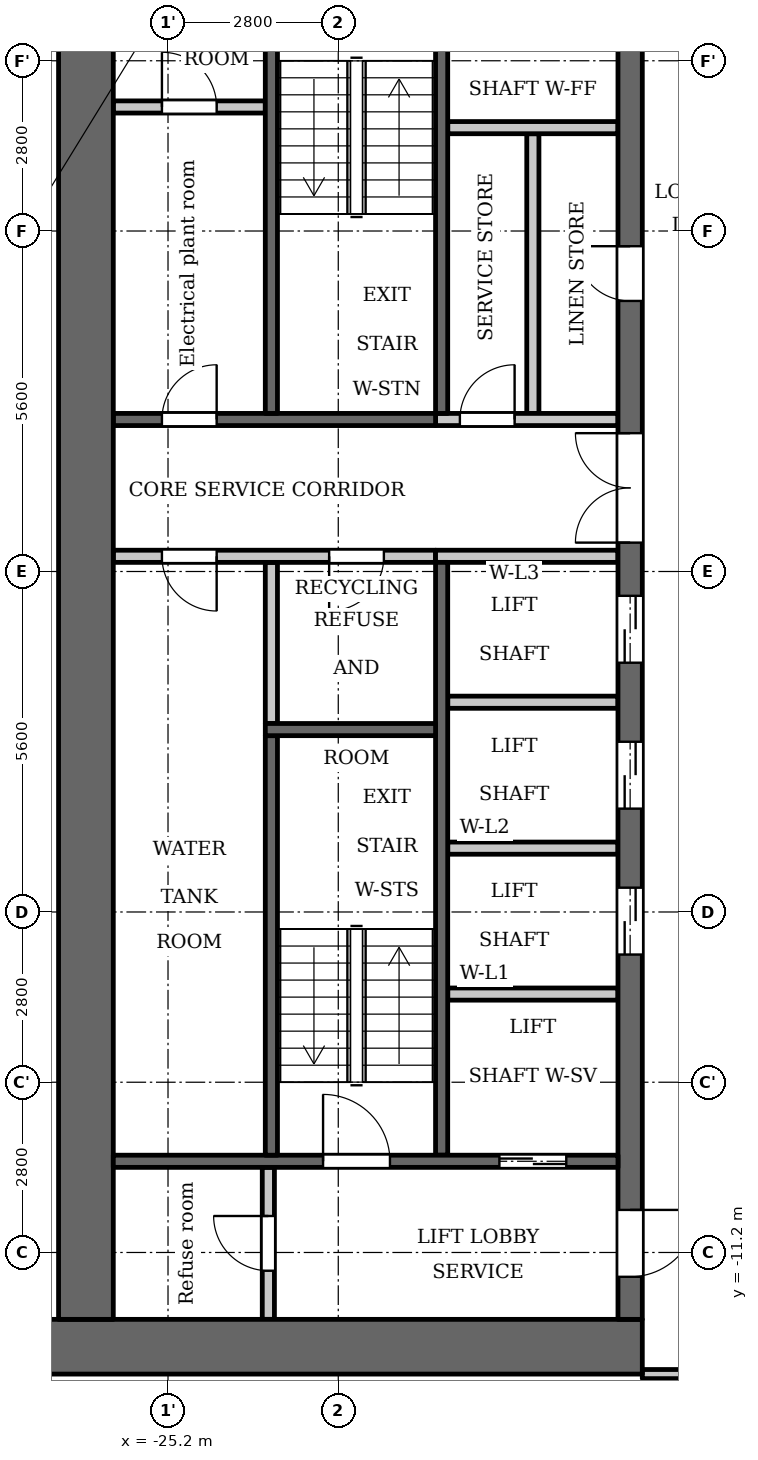
"""IFC4 building model, lengths in metres.
Left out: names, types, materials, properties, quantities, classifications, styles, units other than length and angle.
Written with IfcOpenShell. Run it as: python <this file> out.ifc"""

import sys

from ifc_helpers import new_model, si_unit, direction, frame, frame_2d, origin, place, context, subcontext, project, spatial, rectangle, extrude, element, fill, save


model = new_model("IFC4")
c1 = context("Model", 3, precision=1e-05, world=origin(), true_north=direction((0.0, 1.0)))
c2 = subcontext(c1, "Body", "Model", "MODEL_VIEW")
j1 = project(units=[si_unit("LENGTHUNIT", "METRE"), si_unit("PLANEANGLEUNIT", "RADIAN")], contexts=[c1])
p1 = place(None, origin())
s1 = spatial("IfcSite", under=j1, at=p1, CompositionType="ELEMENT")
p2 = place(p1, origin())
s2 = spatial("IfcBuilding", under=s1, at=p2, CompositionType="ELEMENT")
p3 = place(p2, frame((0.0, 0.0, 69.0)))
s3 = spatial("IfcBuildingStorey", under=s2, at=p3, CompositionType="ELEMENT", Elevation=69.0)
p4 = place(p3, frame((-23.5, -2.5, 0.0), z_axis=(0.0, 0.0, 1.0), x_axis=(0.0, 1.0, 0.0)))
e1 = element("IfcWall", 1, at=p4, inside=s3, PredefinedType="PARTITIONING", context=c2, shape_type="SweptSolid", body=[
    extrude(rectangle(XDim=2.65, YDim=0.2, at=frame_2d((1.325, 0.0))), origin(), (0.0, 0.0, 1.0), 3.15),
])
p5 = place(p3, frame((-20.7, 2.6, 0.0), z_axis=(0.0, 0.0, 1.0), x_axis=(0.0, 1.0, 0.0)))
e2 = element("IfcWall", 2, at=p5, inside=s3, PredefinedType="SHEAR", context=c2, shape_type="SweptSolid", body=[
    extrude(rectangle(XDim=7.0, YDim=0.2, at=frame_2d((3.5, 0.0))), origin(), (0.0, 0.0, 1.0), 3.15),
])
p6 = place(p3, frame((-20.7, -9.6, 0.0), z_axis=(0.0, 0.0, 1.0), x_axis=(0.0, 1.0, 0.0)))
e3 = element("IfcWall", 3, at=p6, inside=s3, PredefinedType="SHEAR", context=c2, shape_type="SweptSolid", body=[
    extrude(rectangle(XDim=9.75, YDim=0.2, at=frame_2d((4.875, 0.0))), origin(), (0.0, 0.0, 1.0), 3.15),
])
p7 = place(p3, frame((-20.8, 2.5, 0.0), z_axis=(0.0, 0.0, 1.0), x_axis=(-1.0, 0.0, 0.0)))
e4 = element("IfcWall", 4, at=p7, inside=s3, PredefinedType="SHEAR", context=c2, shape_type="SweptSolid", body=[
    extrude(rectangle(XDim=5.3, YDim=0.2, at=frame_2d((2.65, 0.0))), origin(), (0.0, 0.0, 1.0), 3.15),
])
p8 = place(p7, frame((3.6, 0.0, 0.0)))
e5 = element("IfcOpeningElement", 5, at=p8, cuts=e4, PredefinedType="OPENING", context=c2, shape_type="SweptSolid", body=[
    extrude(rectangle(XDim=0.9, YDim=2.1, at=frame_2d((0.45, 1.05))), frame((0.0, 0.11, 0.0), z_axis=(0.0, -1.0, 0.0), x_axis=(1.0, 0.0, 0.0)), (0.0, 0.0, 1.0), 0.22),
])
p9 = place(p3, frame((-20.8, 0.25, 0.0), z_axis=(0.0, 0.0, 1.0), x_axis=(-1.0, 0.0, 0.0)))
e6 = element("IfcWall", 6, at=p9, inside=s3, PredefinedType="PARTITIONING", context=c2, shape_type="SweptSolid", body=[
    extrude(rectangle(XDim=5.3, YDim=0.2, at=frame_2d((2.65, 0.0))), origin(), (0.0, 0.0, 1.0), 3.15),
])
p10 = place(p9, frame((0.85, 0.0, 0.0)))
e7 = element("IfcOpeningElement", 7, at=p10, cuts=e6, PredefinedType="OPENING", context=c2, shape_type="SweptSolid", body=[
    extrude(rectangle(XDim=0.9, YDim=2.1, at=frame_2d((0.45, 1.05))), frame((0.0, 0.11, 0.0), z_axis=(0.0, -1.0, 0.0), x_axis=(1.0, 0.0, 0.0)), (0.0, 0.0, 1.0), 0.22),
])
p11 = place(p9, frame((3.6, 0.0, 0.0)))
e8 = element("IfcOpeningElement", 8, at=p11, cuts=e6, PredefinedType="OPENING", context=c2, shape_type="SweptSolid", body=[
    extrude(rectangle(XDim=0.9, YDim=2.1, at=frame_2d((0.45, 1.05))), frame((0.0, 0.11, 0.0), z_axis=(0.0, -1.0, 0.0), x_axis=(1.0, 0.0, 0.0)), (0.0, 0.0, 1.0), 0.22),
])
p12 = place(p3, frame((-17.4, -12.75, 0.0), z_axis=(0.0, 0.0, 1.0), x_axis=(-1.0, 0.0, 0.0)))
e9 = element("IfcWall", 9, at=p12, inside=s3, PredefinedType="SHEAR", context=c2, shape_type="SweptSolid", body=[
    extrude(rectangle(XDim=10.4, YDim=0.9, at=frame_2d((5.2, 0.0))), origin(), (0.0, 0.0, 1.0), 3.15),
])
p13 = place(p3, frame((-19.2, 2.6, 0.0), z_axis=(0.0, 0.0, 1.0), x_axis=(0.0, 1.0, 0.0)))
e10 = element("IfcWall", 10, at=p13, inside=s3, PredefinedType="PARTITIONING", context=c2, shape_type="SweptSolid", body=[
    extrude(rectangle(XDim=4.6, YDim=0.2, at=frame_2d((2.3, 0.0))), origin(), (0.0, 0.0, 1.0), 3.15),
])
p14 = place(p3, frame((-17.6, -12.3, 0.0), z_axis=(0.0, 0.0, 1.0), x_axis=(0.0, 1.0, 0.0)))
e11 = element("IfcWall", 11, at=p14, inside=s3, PredefinedType="SHEAR", context=c2, shape_type="SweptSolid", body=[
    extrude(rectangle(XDim=24.6, YDim=0.4, at=frame_2d((12.3, 0.0))), origin(), (0.0, 0.0, 1.0), 3.15),
])
p15 = place(p14, frame((6.0, 0.0, 0.0)))
e12 = element("IfcOpeningElement", 12, at=p15, cuts=e11, PredefinedType="OPENING", context=c2, shape_type="SweptSolid", body=[
    extrude(rectangle(XDim=1.1, YDim=2.1, at=frame_2d((0.55, 1.05))), frame((0.0, 0.21, 0.0), z_axis=(0.0, -1.0, 0.0), x_axis=(1.0, 0.0, 0.0)), (0.0, 0.0, 1.0), 0.42),
])
p16 = place(p14, frame((8.4, 0.0, 0.0)))
e13 = element("IfcOpeningElement", 13, at=p16, cuts=e11, PredefinedType="OPENING", context=c2, shape_type="SweptSolid", body=[
    extrude(rectangle(XDim=1.1, YDim=2.1, at=frame_2d((0.55, 1.05))), frame((0.0, 0.21, 0.0), z_axis=(0.0, -1.0, 0.0), x_axis=(1.0, 0.0, 0.0)), (0.0, 0.0, 1.0), 0.42),
])
p17 = place(p14, frame((10.8, 0.0, 0.0)))
e14 = element("IfcOpeningElement", 14, at=p17, cuts=e11, PredefinedType="OPENING", context=c2, shape_type="SweptSolid", body=[
    extrude(rectangle(XDim=1.1, YDim=2.1, at=frame_2d((0.55, 1.05))), frame((0.0, 0.21, 0.0), z_axis=(0.0, -1.0, 0.0), x_axis=(1.0, 0.0, 0.0)), (0.0, 0.0, 1.0), 0.42),
])
p18 = place(p14, frame((16.75, 0.0, 0.0)))
e15 = element("IfcOpeningElement", 15, at=p18, cuts=e11, PredefinedType="OPENING", context=c2, shape_type="SweptSolid", body=[
    extrude(rectangle(XDim=0.9, YDim=2.1, at=frame_2d((0.45, 1.05))), frame((0.0, 0.21, 0.0), z_axis=(0.0, -1.0, 0.0), x_axis=(1.0, 0.0, 0.0)), (0.0, 0.0, 1.0), 0.42),
])
p19 = place(p14, frame((22.8, 0.0, 0.0)))
e16 = element("IfcOpeningElement", 16, at=p19, cuts=e11, PredefinedType="OPENING", context=c2, shape_type="SweptSolid", body=[
    extrude(rectangle(XDim=1.1, YDim=2.1, at=frame_2d((0.55, 1.05))), frame((0.0, 0.21, 0.0), z_axis=(0.0, -1.0, 0.0), x_axis=(1.0, 0.0, 0.0)), (0.0, 0.0, 1.0), 0.42),
])
p20 = place(p14, frame((0.7, 0.0, 0.0)))
e17 = element("IfcOpeningElement", 17, at=p20, cuts=e11, PredefinedType="OPENING", context=c2, shape_type="SweptSolid", body=[
    extrude(rectangle(XDim=1.1, YDim=2.1, at=frame_2d((0.55, 1.05))), frame((0.0, 0.21, 0.0), z_axis=(0.0, -1.0, 0.0), x_axis=(1.0, 0.0, 0.0)), (0.0, 0.0, 1.0), 0.42),
])
p21 = place(p14, frame((12.775, 0.0, 0.0)))
e18 = element("IfcOpeningElement", 18, at=p21, cuts=e11, PredefinedType="OPENING", context=c2, shape_type="SweptSolid", body=[
    extrude(rectangle(XDim=1.8, YDim=2.1, at=frame_2d((0.9, 1.05))), frame((0.0, 0.21, 0.0), z_axis=(0.0, -1.0, 0.0), x_axis=(1.0, 0.0, 0.0)), (0.0, 0.0, 1.0), 0.42),
])
p22 = place(p3, frame((-26.55, -12.3, 0.0), z_axis=(0.0, 0.0, 1.0), x_axis=(0.0, 1.0, 0.0)))
e19 = element("IfcWall", 19, at=p22, inside=s3, PredefinedType="SHEAR", context=c2, shape_type="SweptSolid", body=[
    extrude(rectangle(XDim=24.6, YDim=0.9, at=frame_2d((12.3, 0.0))), origin(), (0.0, 0.0, 1.0), 3.15),
])
p23 = place(p3, frame((-23.55, -12.3, 0.0), z_axis=(0.0, 0.0, 1.0), x_axis=(0.0, 1.0, 0.0)))
e20 = element("IfcWall", 20, at=p23, inside=s3, PredefinedType="PARTITIONING", context=c2, shape_type="SweptSolid", body=[
    extrude(rectangle(XDim=2.5, YDim=0.2, at=frame_2d((1.25, 0.0))), origin(), (0.0, 0.0, 1.0), 3.15),
])
p24 = place(p23, frame((0.8, 0.0, 0.0)))
e21 = element("IfcOpeningElement", 21, at=p24, cuts=e20, PredefinedType="OPENING", context=c2, shape_type="SweptSolid", body=[
    extrude(rectangle(XDim=0.9, YDim=2.1, at=frame_2d((0.45, 1.05))), frame((0.0, 0.11, 0.0), z_axis=(0.0, -1.0, 0.0), x_axis=(1.0, 0.0, 0.0)), (0.0, 0.0, 1.0), 0.22),
])
p25 = place(p3, frame((-23.6, 7.64, 0.0), z_axis=(0.0, 0.0, 1.0), x_axis=(-1.0, 0.0, 0.0)))
e22 = element("IfcWall", 22, at=p25, inside=s3, PredefinedType="PARTITIONING", context=c2, shape_type="SweptSolid", body=[
    extrude(rectangle(XDim=2.5, YDim=0.2, at=frame_2d((1.25, 0.0))), origin(), (0.0, 0.0, 1.0), 3.15),
])
p26 = place(p25, frame((0.8, 0.0, 0.0)))
e23 = element("IfcOpeningElement", 23, at=p26, cuts=e22, PredefinedType="OPENING", context=c2, shape_type="SweptSolid", body=[
    extrude(rectangle(XDim=0.9, YDim=2.1, at=frame_2d((0.45, 1.05))), frame((0.0, 0.11, 0.0), z_axis=(0.0, -1.0, 0.0), x_axis=(1.0, 0.0, 0.0)), (0.0, 0.0, 1.0), 0.22),
])
p27 = place(p3, frame((-17.8, -9.7, 0.0), z_axis=(0.0, 0.0, 1.0), x_axis=(-1.0, 0.0, 0.0)))
e24 = element("IfcWall", 24, at=p27, inside=s3, PredefinedType="SHEAR", context=c2, shape_type="SweptSolid", body=[
    extrude(rectangle(XDim=8.3, YDim=0.2, at=frame_2d((4.15, 0.0))), origin(), (0.0, 0.0, 1.0), 3.15),
])
p28 = place(p27, frame((0.85, 0.0, 0.0)))
e25 = element("IfcOpeningElement", 25, at=p28, cuts=e24, PredefinedType="OPENING", context=c2, shape_type="SweptSolid", body=[
    extrude(rectangle(XDim=1.1, YDim=2.1, at=frame_2d((0.55, 1.05))), frame((0.0, 0.11, 0.0), z_axis=(0.0, -1.0, 0.0), x_axis=(1.0, 0.0, 0.0)), (0.0, 0.0, 1.0), 0.22),
])
p29 = place(p27, frame((3.75, 0.0, 0.0)))
e26 = element("IfcOpeningElement", 26, at=p29, cuts=e24, PredefinedType="OPENING", context=c2, shape_type="SweptSolid", body=[
    extrude(rectangle(XDim=1.1, YDim=2.1, at=frame_2d((0.55, 1.05))), frame((0.0, 0.11, 0.0), z_axis=(0.0, -1.0, 0.0), x_axis=(1.0, 0.0, 0.0)), (0.0, 0.0, 1.0), 0.22),
])
for number, where, z_axis, x_axis in (
    (27, (-17.8, -6.95, 0.0), (0.0, 0.0, 1.0), (-1.0, 0.0, 0.0)),
    (28, (-17.8, -4.55, 0.0), (0.0, 0.0, 1.0), (-1.0, 0.0, 0.0)),
    (29, (-17.8, -2.15, 0.0), (0.0, 0.0, 1.0), (-1.0, 0.0, 0.0)),
):
    element("IfcWall", number, at=place(p3, frame(where, z_axis=z_axis, x_axis=x_axis)), inside=s3, PredefinedType="PARTITIONING", context=c2, shape_type="SweptSolid", body=[
        extrude(rectangle(XDim=2.8, YDim=0.2, at=frame_2d((1.4, 0.0))), origin(), (0.0, 0.0, 1.0), 3.15),
    ])
p30 = place(p3, frame((-17.8, 0.25, 0.0), z_axis=(0.0, 0.0, 1.0), x_axis=(-1.0, 0.0, 0.0)))
e30 = element("IfcWall", 30, at=p30, inside=s3, PredefinedType="PARTITIONING", context=c2, shape_type="SweptSolid", body=[
    extrude(rectangle(XDim=3.0, YDim=0.2, at=frame_2d((1.5, 0.0))), origin(), (0.0, 0.0, 1.0), 3.15),
])
p31 = place(p3, frame((-17.8, 2.5, 0.0), z_axis=(0.0, 0.0, 1.0), x_axis=(-1.0, 0.0, 0.0)))
e31 = element("IfcWall", 31, at=p31, inside=s3, PredefinedType="PARTITIONING", context=c2, shape_type="SweptSolid", body=[
    extrude(rectangle(XDim=3.0, YDim=0.2, at=frame_2d((1.5, 0.0))), origin(), (0.0, 0.0, 1.0), 3.15),
])
p32 = place(p31, frame((1.7, 0.0, 0.0)))
e32 = element("IfcOpeningElement", 32, at=p32, cuts=e31, PredefinedType="OPENING", context=c2, shape_type="SweptSolid", body=[
    extrude(rectangle(XDim=0.9, YDim=2.1, at=frame_2d((0.45, 1.05))), frame((0.0, 0.11, 0.0), z_axis=(0.0, -1.0, 0.0), x_axis=(1.0, 0.0, 0.0)), (0.0, 0.0, 1.0), 0.22),
])
p33 = place(p3, frame((-17.8, 7.3, 0.0), z_axis=(0.0, 0.0, 1.0), x_axis=(-1.0, 0.0, 0.0)))
e33 = element("IfcWall", 33, at=p33, inside=s3, PredefinedType="PARTITIONING", context=c2, shape_type="SweptSolid", body=[
    extrude(rectangle(XDim=2.8, YDim=0.2, at=frame_2d((1.4, 0.0))), origin(), (0.0, 0.0, 1.0), 3.15),
])
p34 = place(p3, frame((-23.5, 2.6, 0.0), z_axis=(0.0, 0.0, 1.0), x_axis=(0.0, 1.0, 0.0)))
e34 = element("IfcWall", 34, at=p34, inside=s3, PredefinedType="SHEAR", context=c2, shape_type="SweptSolid", body=[
    extrude(rectangle(XDim=7.0, YDim=0.2, at=frame_2d((3.5, 0.0))), origin(), (0.0, 0.0, 1.0), 3.15),
])
p35 = place(p3, frame((-23.5, -9.6, 0.0), z_axis=(0.0, 0.0, 1.0), x_axis=(0.0, 1.0, 0.0)))
e35 = element("IfcWall", 35, at=p35, inside=s3, PredefinedType="SHEAR", context=c2, shape_type="SweptSolid", body=[
    extrude(rectangle(XDim=6.9, YDim=0.2, at=frame_2d((3.45, 0.0))), origin(), (0.0, 0.0, 1.0), 3.15),
])
p36 = place(p3, frame((-20.8, -2.6, 0.0), z_axis=(0.0, 0.0, 1.0), x_axis=(-1.0, 0.0, 0.0)))
e36 = element("IfcWall", 36, at=p36, inside=s3, PredefinedType="SHEAR", context=c2, shape_type="SweptSolid", body=[
    extrude(rectangle(XDim=2.8, YDim=0.2, at=frame_2d((1.4, 0.0))), origin(), (0.0, 0.0, 1.0), 3.15),
])
p37 = place(p3, frame((-17.4, -13.2, 0.0), z_axis=(0.0, 0.0, 1.0), x_axis=(1.0, 0.0, 0.0)))
e37 = element("IfcWall", 37, at=p37, inside=s3, PredefinedType="PARTITIONING", context=c2, shape_type="SweptSolid", body=[
    extrude(rectangle(XDim=34.8, YDim=0.15, at=frame_2d((17.4, 0.0))), origin(), (0.0, 0.0, 1.0), 3.15),
])
p38 = place(p37, frame((0.65, 0.0, 0.0)))
e38 = element("IfcOpeningElement", 38, at=p38, cuts=e37, PredefinedType="OPENING", context=c2, shape_type="SweptSolid", body=[
    extrude(rectangle(XDim=1.0, YDim=2.1, at=frame_2d((0.5, 1.05))), frame((0.0, 0.085, 0.0), z_axis=(0.0, -1.0, 0.0), x_axis=(1.0, 0.0, 0.0)), (0.0, 0.0, 1.0), 0.17),
])
p39 = place(p37, frame((33.05, 0.0, 0.0)))
e39 = element("IfcOpeningElement", 39, at=p39, cuts=e37, PredefinedType="OPENING", context=c2, shape_type="SweptSolid", body=[
    extrude(rectangle(XDim=1.0, YDim=2.1, at=frame_2d((0.5, 1.05))), frame((0.0, 0.085, 0.0), z_axis=(0.0, -1.0, 0.0), x_axis=(1.0, 0.0, 0.0)), (0.0, 0.0, 1.0), 0.17),
])
p40 = place(p37, frame((4.55, 0.0, 0.0)))
e40 = element("IfcOpeningElement", 40, at=p40, cuts=e37, PredefinedType="OPENING", context=c2, shape_type="SweptSolid", body=[
    extrude(rectangle(XDim=1.0, YDim=2.1, at=frame_2d((0.5, 1.05))), frame((0.0, 0.085, 0.0), z_axis=(0.0, -1.0, 0.0), x_axis=(1.0, 0.0, 0.0)), (0.0, 0.0, 1.0), 0.17),
])
p41 = place(p37, frame((15.75, 0.0, 0.0)))
e41 = element("IfcOpeningElement", 41, at=p41, cuts=e37, PredefinedType="OPENING", context=c2, shape_type="SweptSolid", body=[
    extrude(rectangle(XDim=1.0, YDim=2.1, at=frame_2d((0.5, 1.05))), frame((0.0, 0.085, 0.0), z_axis=(0.0, -1.0, 0.0), x_axis=(1.0, 0.0, 0.0)), (0.0, 0.0, 1.0), 0.17),
])
p42 = place(p37, frame((18.1, 0.0, 0.0)))
e42 = element("IfcOpeningElement", 42, at=p42, cuts=e37, PredefinedType="OPENING", context=c2, shape_type="SweptSolid", body=[
    extrude(rectangle(XDim=1.0, YDim=2.1, at=frame_2d((0.5, 1.05))), frame((0.0, 0.085, 0.0), z_axis=(0.0, -1.0, 0.0), x_axis=(1.0, 0.0, 0.0)), (0.0, 0.0, 1.0), 0.17),
])
p43 = place(p37, frame((26.95, 0.0, 0.0)))
e43 = element("IfcOpeningElement", 43, at=p43, cuts=e37, PredefinedType="OPENING", context=c2, shape_type="SweptSolid", body=[
    extrude(rectangle(XDim=1.0, YDim=2.1, at=frame_2d((0.5, 1.05))), frame((0.0, 0.085, 0.0), z_axis=(0.0, -1.0, 0.0), x_axis=(1.0, 0.0, 0.0)), (0.0, 0.0, 1.0), 0.17),
])
p44 = place(p28, origin())
e44 = element("IfcDoor", 44, at=p44, inside=s3, OperationType="DOUBLE_DOOR_SLIDING", PredefinedType="DOOR", context=c2, shape_type="SweptSolid", body=[
    extrude(rectangle(XDim=1.1, YDim=2.1, at=frame_2d((0.55, 1.05))), frame((0.0, 0.025, 0.0), z_axis=(0.0, -1.0, 0.0), x_axis=(1.0, 0.0, 0.0)), (0.0, 0.0, 1.0), 0.05),
])
fill(e25, e44)
p45 = place(p15, origin())
e45 = element("IfcDoor", 45, at=p45, inside=s3, OperationType="DOUBLE_DOOR_SLIDING", PredefinedType="DOOR", context=c2, shape_type="SweptSolid", body=[
    extrude(rectangle(XDim=1.1, YDim=2.1, at=frame_2d((0.55, 1.05))), frame((0.0, 0.025, 0.0), z_axis=(0.0, -1.0, 0.0), x_axis=(1.0, 0.0, 0.0)), (0.0, 0.0, 1.0), 0.05),
])
fill(e12, e45)
p46 = place(p16, origin())
e46 = element("IfcDoor", 46, at=p46, inside=s3, OperationType="DOUBLE_DOOR_SLIDING", PredefinedType="DOOR", context=c2, shape_type="SweptSolid", body=[
    extrude(rectangle(XDim=1.1, YDim=2.1, at=frame_2d((0.55, 1.05))), frame((0.0, 0.025, 0.0), z_axis=(0.0, -1.0, 0.0), x_axis=(1.0, 0.0, 0.0)), (0.0, 0.0, 1.0), 0.05),
])
fill(e13, e46)
p47 = place(p17, origin())
e47 = element("IfcDoor", 47, at=p47, inside=s3, OperationType="DOUBLE_DOOR_SLIDING", PredefinedType="DOOR", context=c2, shape_type="SweptSolid", body=[
    extrude(rectangle(XDim=1.1, YDim=2.1, at=frame_2d((0.55, 1.05))), frame((0.0, 0.025, 0.0), z_axis=(0.0, -1.0, 0.0), x_axis=(1.0, 0.0, 0.0)), (0.0, 0.0, 1.0), 0.05),
])
fill(e14, e47)
p48 = place(p18, origin())
e48 = element("IfcDoor", 48, at=p48, inside=s3, OperationType="SINGLE_SWING_LEFT", PredefinedType="DOOR", context=c2, shape_type="SweptSolid", body=[
    extrude(rectangle(XDim=0.9, YDim=2.1, at=frame_2d((0.45, 1.05))), frame((0.0, 0.025, 0.0), z_axis=(0.0, -1.0, 0.0), x_axis=(1.0, 0.0, 0.0)), (0.0, 0.0, 1.0), 0.05),
])
fill(e15, e48)
p49 = place(p32, origin())
e49 = element("IfcDoor", 49, at=p49, inside=s3, OperationType="SINGLE_SWING_LEFT", PredefinedType="DOOR", context=c2, shape_type="SweptSolid", body=[
    extrude(rectangle(XDim=0.9, YDim=2.1, at=frame_2d((0.45, 1.05))), frame((0.0, 0.025, 0.0), z_axis=(0.0, -1.0, 0.0), x_axis=(1.0, 0.0, 0.0)), (0.0, 0.0, 1.0), 0.05),
])
fill(e32, e49)
p50 = place(p20, origin())
e50 = element("IfcDoor", 50, at=p50, inside=s3, OperationType="SINGLE_SWING_RIGHT", PredefinedType="DOOR", context=c2, shape_type="SweptSolid", body=[
    extrude(rectangle(XDim=1.1, YDim=2.1, at=frame_2d((0.55, 1.05))), frame((0.0, 0.025, 0.0), z_axis=(0.0, -1.0, 0.0), x_axis=(1.0, 0.0, 0.0)), (0.0, 0.0, 1.0), 0.05),
])
fill(e17, e50)
p51 = place(p24, origin())
e51 = element("IfcDoor", 51, at=p51, inside=s3, OperationType="SINGLE_SWING_LEFT", PredefinedType="DOOR", context=c2, shape_type="SweptSolid", body=[
    extrude(rectangle(XDim=0.9, YDim=2.1, at=frame_2d((0.45, 1.05))), frame((0.0, 0.025, 0.0), z_axis=(0.0, -1.0, 0.0), x_axis=(1.0, 0.0, 0.0)), (0.0, 0.0, 1.0), 0.05),
])
fill(e21, e51)
p52 = place(p29, origin())
e52 = element("IfcDoor", 52, at=p52, inside=s3, OperationType="SINGLE_SWING_RIGHT", PredefinedType="DOOR", context=c2, shape_type="SweptSolid", body=[
    extrude(rectangle(XDim=1.1, YDim=2.1, at=frame_2d((0.55, 1.05))), frame((0.0, 0.025, 0.0), z_axis=(0.0, -1.0, 0.0), x_axis=(1.0, 0.0, 0.0)), (0.0, 0.0, 1.0), 0.05),
])
fill(e26, e52)
p53 = place(p21, origin())
e53 = element("IfcDoor", 53, at=p53, inside=s3, OperationType="DOUBLE_DOOR_SINGLE_SWING", PredefinedType="DOOR", context=c2, shape_type="SweptSolid", body=[
    extrude(rectangle(XDim=1.8, YDim=2.1, at=frame_2d((0.9, 1.05))), frame((0.0, 0.025, 0.0), z_axis=(0.0, -1.0, 0.0), x_axis=(1.0, 0.0, 0.0)), (0.0, 0.0, 1.0), 0.05),
])
fill(e18, e53)
p54 = place(p10, origin())
e54 = element("IfcDoor", 54, at=p54, inside=s3, OperationType="SINGLE_SWING_LEFT", PredefinedType="DOOR", context=c2, shape_type="SweptSolid", body=[
    extrude(rectangle(XDim=0.9, YDim=2.1, at=frame_2d((0.45, 1.05))), frame((0.0, 0.025, 0.0), z_axis=(0.0, -1.0, 0.0), x_axis=(1.0, 0.0, 0.0)), (0.0, 0.0, 1.0), 0.05),
])
fill(e7, e54)
p55 = place(p11, origin())
e55 = element("IfcDoor", 55, at=p55, inside=s3, OperationType="SINGLE_SWING_RIGHT", PredefinedType="DOOR", context=c2, shape_type="SweptSolid", body=[
    extrude(rectangle(XDim=0.9, YDim=2.1, at=frame_2d((0.45, 1.05))), frame((0.0, 0.025, 0.0), z_axis=(0.0, -1.0, 0.0), x_axis=(1.0, 0.0, 0.0)), (0.0, 0.0, 1.0), 0.05),
])
fill(e8, e55)
p56 = place(p26, origin())
e56 = element("IfcDoor", 56, at=p56, inside=s3, OperationType="SINGLE_SWING_RIGHT", PredefinedType="DOOR", context=c2, shape_type="SweptSolid", body=[
    extrude(rectangle(XDim=0.9, YDim=2.1, at=frame_2d((0.45, 1.05))), frame((0.0, 0.025, 0.0), z_axis=(0.0, -1.0, 0.0), x_axis=(1.0, 0.0, 0.0)), (0.0, 0.0, 1.0), 0.05),
])
fill(e23, e56)
p57 = place(p8, origin())
e57 = element("IfcDoor", 57, at=p57, inside=s3, OperationType="SINGLE_SWING_LEFT", PredefinedType="DOOR", context=c2, shape_type="SweptSolid", body=[
    extrude(rectangle(XDim=0.9, YDim=2.1, at=frame_2d((0.45, 1.05))), frame((0.0, 0.025, 0.0), z_axis=(0.0, -1.0, 0.0), x_axis=(1.0, 0.0, 0.0)), (0.0, 0.0, 1.0), 0.05),
])
fill(e5, e57)
save(model, sys.argv[1])
